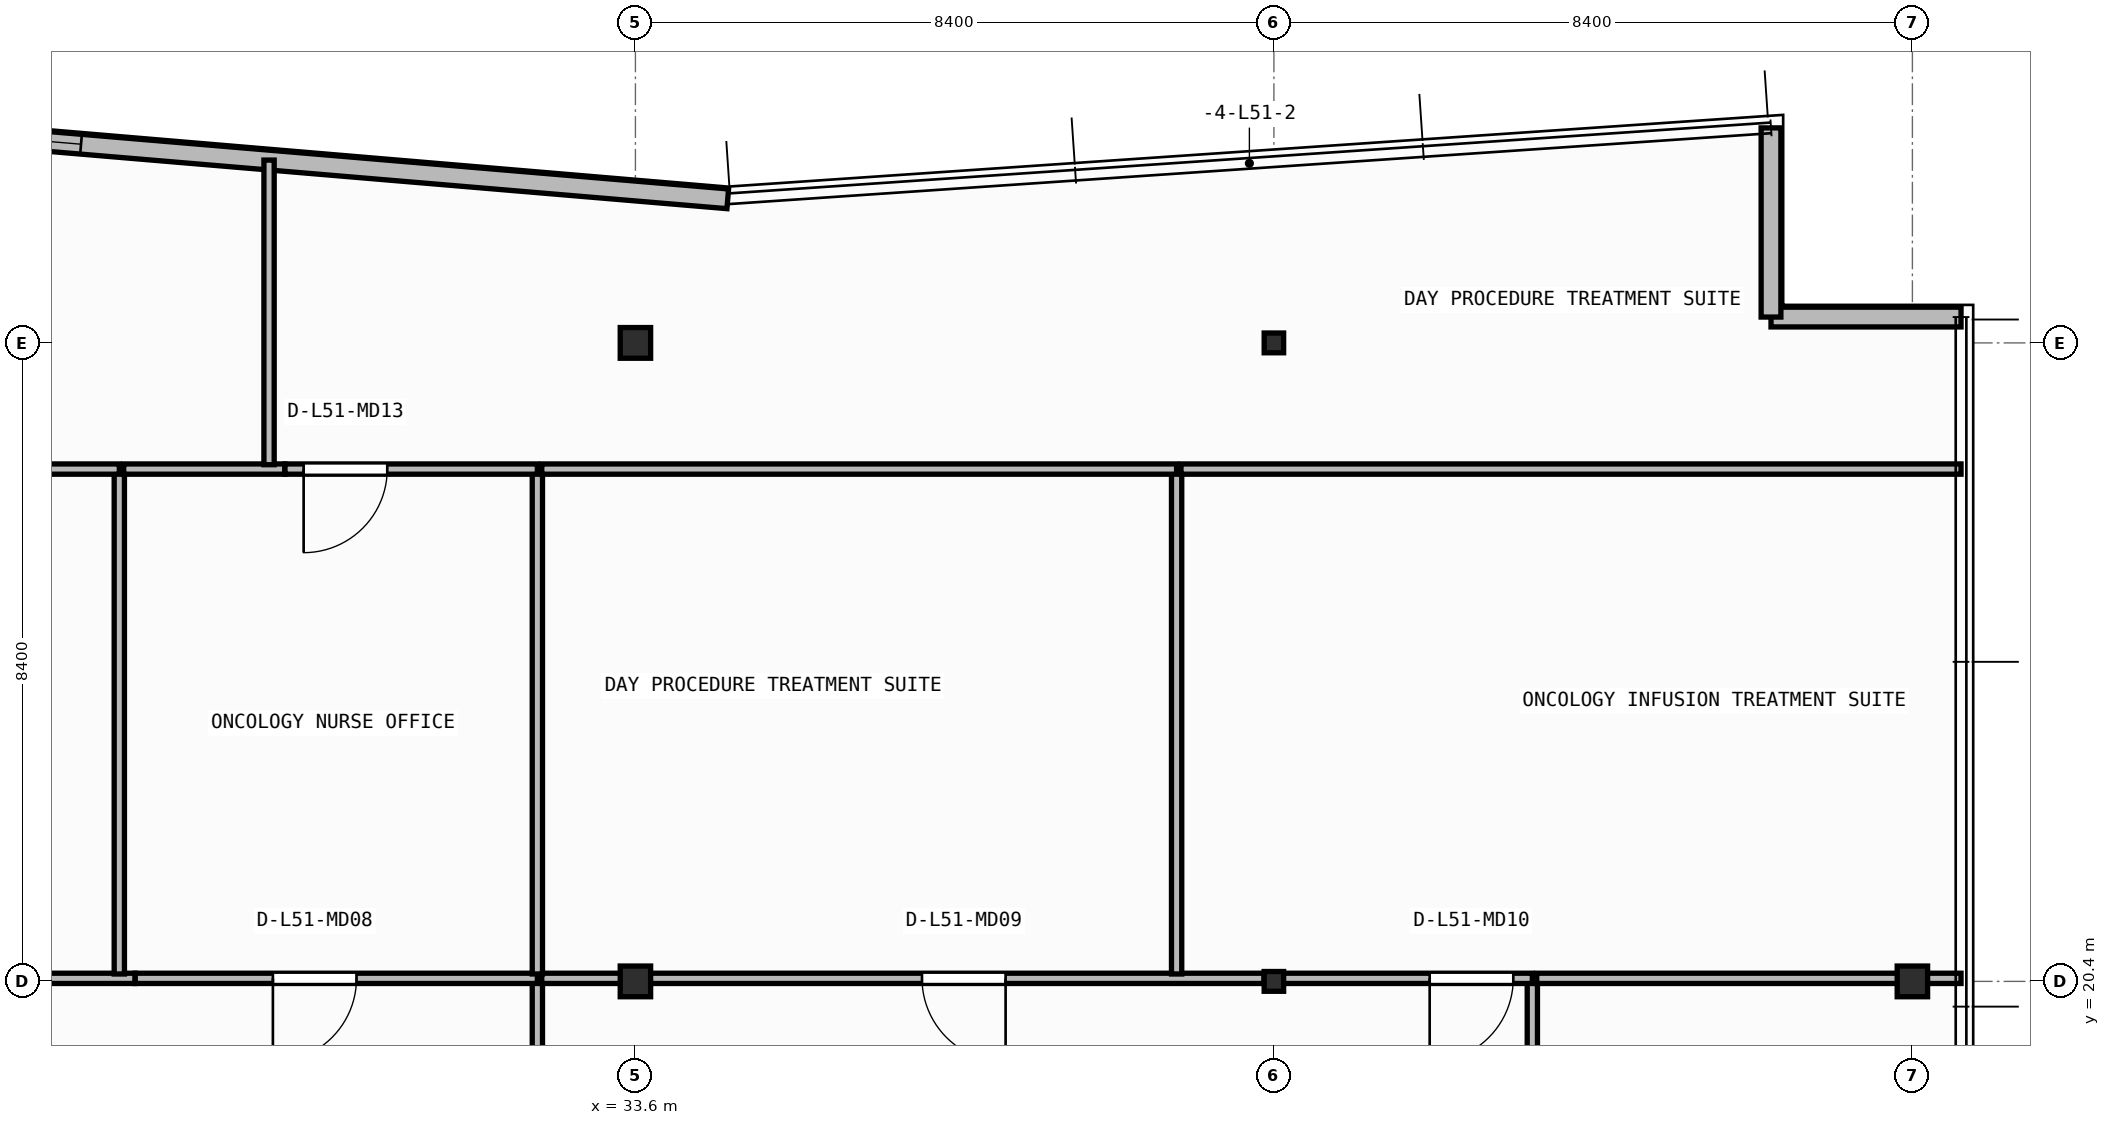
"""IFC4 building model, lengths in metres.
Left out: names, types, materials, properties, quantities, classifications, styles, units other than length and angle.
Written with IfcOpenShell. Run it as: python <this file> out.ifc"""

import sys

from ifc_helpers import new_model, si_unit, direction, frame, frame_2d, origin, origin_2d, place, context, subcontext, project, spatial, rectangle, i_section, extrude, element, fill, save


model = new_model("IFC4")
c1 = context("Model", 3, precision=1e-05, world=origin(), true_north=direction((0.0, 1.0)))
c2 = subcontext(c1, "Body", "Model", "MODEL_VIEW")
j1 = project(units=[si_unit("LENGTHUNIT", "METRE"), si_unit("PLANEANGLEUNIT", "RADIAN")], contexts=[c1])
p1 = place(None, origin())
s1 = spatial("IfcSite", under=j1, at=p1, CompositionType="ELEMENT")
p2 = place(p1, origin())
s2 = spatial("IfcBuilding", under=s1, at=p2, CompositionType="ELEMENT")
p3 = place(p2, frame((0.0, 0.0, 207.9)))
s3 = spatial("IfcBuildingStorey", under=s2, at=p3, CompositionType="ELEMENT", Elevation=207.9)
p4 = place(p3, frame((33.6, 20.4, 0.0), z_axis=(0.0, 0.0, 1.0), x_axis=(1.0, 0.0, 0.0)))
e1 = element("IfcColumn", 1, at=p4, inside=s3, PredefinedType="COLUMN", context=c2, shape_type="SweptSolid", body=[
    extrude(i_section(OverallWidth=0.4, OverallDepth=0.404, WebThickness=0.02, FlangeThickness=0.032, at=origin_2d()), origin(), (0.0, 0.0, 1.0), 3.95),
])
p5 = place(p3, frame((42.0, 20.4, 0.0), z_axis=(0.0, 0.0, 1.0), x_axis=(1.0, 0.0, 0.0)))
e2 = element("IfcColumn", 2, at=p5, inside=s3, PredefinedType="COLUMN", context=c2, shape_type="SweptSolid", body=[
    extrude(i_section(OverallWidth=0.256, OverallDepth=0.26, WebThickness=0.01, FlangeThickness=0.017, FilletRadius=0.013, at=origin_2d()), origin(), (0.0, 0.0, 1.0), 3.95),
])
for number, where, z_axis, x_axis in (
    (3, (50.4, 20.4, 0.0), (0.0, 0.0, 1.0), (1.0, 0.0, 0.0)),
    (4, (33.6, 28.8, 0.0), (0.0, 0.0, 1.0), (1.0, 0.0, 0.0)),
):
    element("IfcColumn", number, at=place(p3, frame(where, z_axis=z_axis, x_axis=x_axis)), inside=s3, PredefinedType="COLUMN", context=c2, shape_type="SweptSolid", body=[
        extrude(i_section(OverallWidth=0.4, OverallDepth=0.404, WebThickness=0.02, FlangeThickness=0.032, at=origin_2d()), origin(), (0.0, 0.0, 1.0), 3.95),
    ])
p6 = place(p3, frame((42.0, 28.8, 0.0), z_axis=(0.0, 0.0, 1.0), x_axis=(1.0, 0.0, 0.0)))
e5 = element("IfcColumn", 5, at=p6, inside=s3, PredefinedType="COLUMN", context=c2, shape_type="SweptSolid", body=[
    extrude(i_section(OverallWidth=0.256, OverallDepth=0.26, WebThickness=0.01, FlangeThickness=0.017, FilletRadius=0.013, at=origin_2d()), origin(), (0.0, 0.0, 1.0), 3.95),
])
p7 = place(p3, frame((51.04, 29.14, 0.0), z_axis=(0.0, 0.0, 1.0), x_axis=(-1.0, 0.0, 0.0)))
e6 = element("IfcWall", 6, at=p7, inside=s3, PredefinedType="STANDARD", context=c2, shape_type="SweptSolid", body=[
    extrude(rectangle(XDim=2.5, YDim=0.26, at=frame_2d((1.25, 0.0))), origin(), (0.0, 0.0, 1.0), 3.71),
])
p8 = place(p3, frame((48.54, 29.14, 0.0), z_axis=(0.0, 0.0, 1.0), x_axis=(0.0, 1.0, 0.0)))
e7 = element("IfcWall", 7, at=p8, inside=s3, PredefinedType="STANDARD", context=c2, shape_type="SweptSolid", body=[
    extrude(rectangle(XDim=2.489, YDim=0.26, at=frame_2d((1.245, 0.0))), origin(), (0.0, 0.0, 1.0), 3.71),
])
p9 = place(p3, frame((34.815, 30.696, 0.0), z_axis=(0.0, 0.0, 1.0), x_axis=(-0.996454704935, 0.084130975344, 0.0)))
e8 = element("IfcWall", 8, at=p9, inside=s3, PredefinedType="STANDARD", context=c2, shape_type="SweptSolid", body=[
    extrude(rectangle(XDim=13.401, YDim=0.26, at=frame_2d((6.701, 0.0))), origin(), (0.0, 0.0, 1.0), 3.71),
])
p10 = place(p9, frame((8.539, 0.0, 0.9)))
e9 = element("IfcOpeningElement", 9, at=p10, cuts=e8, PredefinedType="OPENING", context=c2, shape_type="SweptSolid", body=[
    extrude(rectangle(XDim=2.4, YDim=1.65, at=frame_2d((1.2, 0.825))), frame((0.0, 0.14, 0.0), z_axis=(0.0, -1.0, 0.0), x_axis=(1.0, 0.0, 0.0)), (0.0, 0.0, 1.0), 0.28),
])
p11 = place(p3, frame((32.31, 14.76, 0.0), z_axis=(0.0, 0.0, 1.0), x_axis=(0.0, 1.0, 0.0)))
e10 = element("IfcWall", 10, at=p11, inside=s3, PredefinedType="PARTITIONING", context=c2, shape_type="SweptSolid", body=[
    extrude(rectangle(XDim=5.68, YDim=0.135, at=frame_2d((2.84, 0.0))), origin(), (0.0, 0.0, 1.0), 3.71),
])
p12 = place(p3, frame((27.018, 20.44, 0.0), z_axis=(0.0, 0.0, 1.0), x_axis=(-1.0, 0.0, 0.0)))
e11 = element("IfcWall", 11, at=p12, inside=s3, PredefinedType="PARTITIONING", context=c2, shape_type="SweptSolid", body=[
    extrude(rectangle(XDim=4.83, YDim=0.135, at=frame_2d((2.415, 0.0))), origin(), (0.0, 0.0, 1.0), 3.152),
])
p13 = place(p3, frame((32.31, 20.44, 0.0), z_axis=(0.0, 0.0, 1.0), x_axis=(-1.0, 0.0, 0.0)))
e12 = element("IfcWall", 12, at=p13, inside=s3, PredefinedType="PARTITIONING", context=c2, shape_type="SweptSolid", body=[
    extrude(rectangle(XDim=5.291, YDim=0.135, at=frame_2d((2.645, 0.0))), origin(), (0.0, 0.0, 1.0), 3.152),
])
p14 = place(p13, frame((2.379, 0.0, 0.0)))
e13 = element("IfcOpeningElement", 13, at=p14, cuts=e12, PredefinedType="OPENING", context=c2, shape_type="SweptSolid", body=[
    extrude(rectangle(XDim=1.1, YDim=2.1, at=frame_2d((0.55, 1.05))), frame((0.0, 0.077, 0.0), z_axis=(0.0, -1.0, 0.0), x_axis=(1.0, 0.0, 0.0)), (0.0, 0.0, 1.0), 0.155),
])
p15 = place(p3, frame((45.4, 14.76, 0.0), z_axis=(0.0, 0.0, 1.0), x_axis=(0.0, 1.0, 0.0)))
e14 = element("IfcWall", 14, at=p15, inside=s3, PredefinedType="PARTITIONING", context=c2, shape_type="SweptSolid", body=[
    extrude(rectangle(XDim=5.68, YDim=0.135, at=frame_2d((2.84, 0.0))), origin(), (0.0, 0.0, 1.0), 3.71),
])
p16 = place(p3, frame((41.872, 20.44, 0.0), z_axis=(0.0, 0.0, 1.0), x_axis=(-1.0, 0.0, 0.0)))
e15 = element("IfcWall", 15, at=p16, inside=s3, PredefinedType="PARTITIONING", context=c2, shape_type="SweptSolid", body=[
    extrude(rectangle(XDim=9.505, YDim=0.135, at=frame_2d((4.752, 0.0))), origin(), (0.0, 0.0, 1.0), 3.152),
])
p17 = place(p16, frame((3.402, 0.0, 0.0)))
e16 = element("IfcOpeningElement", 16, at=p17, cuts=e15, PredefinedType="OPENING", context=c2, shape_type="SweptSolid", body=[
    extrude(rectangle(XDim=1.1, YDim=2.1, at=frame_2d((0.55, 1.05))), frame((0.0, 0.077, 0.0), z_axis=(0.0, -1.0, 0.0), x_axis=(1.0, 0.0, 0.0)), (0.0, 0.0, 1.0), 0.155),
])
p18 = place(p3, frame((45.4, 20.44, 0.0), z_axis=(0.0, 0.0, 1.0), x_axis=(-1.0, 0.0, 0.0)))
e17 = element("IfcWall", 17, at=p18, inside=s3, PredefinedType="PARTITIONING", context=c2, shape_type="SweptSolid", body=[
    extrude(rectangle(XDim=3.526, YDim=0.135, at=frame_2d((1.763, 0.0))), origin(), (0.0, 0.0, 1.0), 3.152),
])
p19 = place(p18, frame((0.25, 0.0, 0.0)))
e18 = element("IfcOpeningElement", 18, at=p19, cuts=e17, PredefinedType="OPENING", context=c2, shape_type="SweptSolid", body=[
    extrude(rectangle(XDim=1.1, YDim=2.1, at=frame_2d((0.55, 1.05))), frame((0.0, 0.077, 0.0), z_axis=(0.0, -1.0, 0.0), x_axis=(1.0, 0.0, 0.0)), (0.0, 0.0, 1.0), 0.155),
])
p20 = place(p3, frame((51.04, 20.44, 0.0), z_axis=(0.0, 0.0, 1.0), x_axis=(-1.0, 0.0, 0.0)))
e19 = element("IfcWall", 19, at=p20, inside=s3, PredefinedType="PARTITIONING", context=c2, shape_type="SweptSolid", body=[
    extrude(rectangle(XDim=5.583, YDim=0.135, at=frame_2d((2.791, 0.0))), origin(), (0.0, 0.0, 1.0), 3.152),
])
p21 = place(p3, frame((26.81, 20.498, 0.0), z_axis=(0.0, 0.0, 1.0), x_axis=(0.0, 1.0, 0.0)))
e20 = element("IfcWall", 20, at=p21, inside=s3, PredefinedType="PARTITIONING", context=c2, shape_type="SweptSolid", body=[
    extrude(rectangle(XDim=6.642, YDim=0.135, at=frame_2d((3.321, 0.0))), origin(), (0.0, 0.0, 1.0), 3.71),
])
p22 = place(p3, frame((26.81, 27.14, 0.0), z_axis=(0.0, 0.0, 1.0), x_axis=(-1.0, 0.0, 0.0)))
e21 = element("IfcWall", 21, at=p22, inside=s3, PredefinedType="PARTITIONING", context=c2, shape_type="SweptSolid", body=[
    extrude(rectangle(XDim=13.03, YDim=0.135, at=frame_2d((6.515, 0.0))), origin(), (0.0, 0.0, 1.0), 3.71),
])
p23 = place(p22, frame((5.1, 0.0, 0.0)))
e22 = element("IfcOpeningElement", 22, at=p23, cuts=e21, PredefinedType="OPENING", context=c2, shape_type="SweptSolid", body=[
    extrude(rectangle(XDim=1.1, YDim=2.1, at=frame_2d((0.55, 1.05))), frame((0.0, 0.077, 0.0), z_axis=(0.0, -1.0, 0.0), x_axis=(1.0, 0.0, 0.0)), (0.0, 0.0, 1.0), 0.155),
])
p24 = place(p3, frame((32.31, 20.498, 0.0), z_axis=(0.0, 0.0, 1.0), x_axis=(0.0, 1.0, 0.0)))
e23 = element("IfcWall", 23, at=p24, inside=s3, PredefinedType="PARTITIONING", context=c2, shape_type="SweptSolid", body=[
    extrude(rectangle(XDim=6.642, YDim=0.135, at=frame_2d((3.321, 0.0))), origin(), (0.0, 0.0, 1.0), 3.71),
])
p25 = place(p3, frame((28.988, 27.14, 0.0), z_axis=(0.0, 0.0, 1.0), x_axis=(-1.0, 0.0, 0.0)))
e24 = element("IfcWall", 24, at=p25, inside=s3, PredefinedType="PARTITIONING", context=c2, shape_type="SweptSolid", body=[
    extrude(rectangle(XDim=2.12, YDim=0.135, at=frame_2d((1.06, 0.0))), origin(), (0.0, 0.0, 1.0), 3.71),
])
p26 = place(p3, frame((32.31, 27.14, 0.0), z_axis=(0.0, 0.0, 1.0), x_axis=(-1.0, 0.0, 0.0)))
e25 = element("IfcWall", 25, at=p26, inside=s3, PredefinedType="PARTITIONING", context=c2, shape_type="SweptSolid", body=[
    extrude(rectangle(XDim=3.321, YDim=0.135, at=frame_2d((1.66, 0.0))), origin(), (0.0, 0.0, 1.0), 3.71),
])
p27 = place(p26, frame((1.975, 0.0, 0.0)))
e26 = element("IfcOpeningElement", 26, at=p27, cuts=e25, PredefinedType="OPENING", context=c2, shape_type="SweptSolid", body=[
    extrude(rectangle(XDim=1.1, YDim=2.1, at=frame_2d((0.55, 1.05))), frame((0.0, 0.077, 0.0), z_axis=(0.0, -1.0, 0.0), x_axis=(1.0, 0.0, 0.0)), (0.0, 0.0, 1.0), 0.155),
])
p28 = place(p3, frame((40.72, 20.498, 0.0), z_axis=(0.0, 0.0, 1.0), x_axis=(0.0, 1.0, 0.0)))
e27 = element("IfcWall", 27, at=p28, inside=s3, PredefinedType="PARTITIONING", context=c2, shape_type="SweptSolid", body=[
    extrude(rectangle(XDim=6.642, YDim=0.135, at=frame_2d((3.321, 0.0))), origin(), (0.0, 0.0, 1.0), 3.71),
])
p29 = place(p3, frame((40.72, 27.14, 0.0), z_axis=(0.0, 0.0, 1.0), x_axis=(-1.0, 0.0, 0.0)))
e28 = element("IfcWall", 28, at=p29, inside=s3, PredefinedType="PARTITIONING", context=c2, shape_type="SweptSolid", body=[
    extrude(rectangle(XDim=8.353, YDim=0.135, at=frame_2d((4.176, 0.0))), origin(), (0.0, 0.0, 1.0), 3.71),
])
p30 = place(p3, frame((51.04, 27.14, 0.0), z_axis=(0.0, 0.0, 1.0), x_axis=(-1.0, 0.0, 0.0)))
e29 = element("IfcWall", 29, at=p30, inside=s3, PredefinedType="PARTITIONING", context=c2, shape_type="SweptSolid", body=[
    extrude(rectangle(XDim=10.262, YDim=0.135, at=frame_2d((5.131, 0.0))), origin(), (0.0, 0.0, 1.0), 3.71),
])
p31 = place(p3, frame((28.78, 27.198, 0.0), z_axis=(0.0, 0.0, 1.0), x_axis=(0.0, 1.0, 0.0)))
e30 = element("IfcWall", 30, at=p31, inside=s3, PredefinedType="PARTITIONING", context=c2, shape_type="SweptSolid", body=[
    extrude(rectangle(XDim=4.008, YDim=0.135, at=frame_2d((2.004, 0.0))), origin(), (0.0, 0.0, 1.0), 3.71),
])
p32 = place(p10, origin())
e31 = element("IfcWindow", 31, at=p32, inside=s3, PartitioningType="SINGLE_PANEL", PredefinedType="WINDOW", context=c2, shape_type="SweptSolid", body=[
    extrude(rectangle(XDim=2.4, YDim=1.65, at=frame_2d((1.2, 0.825))), frame((0.0, 0.03, 0.0), z_axis=(0.0, -1.0, 0.0), x_axis=(1.0, 0.0, 0.0)), (0.0, 0.0, 1.0), 0.06),
])
fill(e9, e31)
p33 = place(p14, origin())
e32 = element("IfcDoor", 32, at=p33, inside=s3, OperationType="SINGLE_SWING_RIGHT", PredefinedType="DOOR", context=c2, shape_type="SweptSolid", body=[
    extrude(rectangle(XDim=1.1, YDim=2.1, at=frame_2d((0.55, 1.05))), frame((0.0, 0.025, 0.0), z_axis=(0.0, -1.0, 0.0), x_axis=(1.0, 0.0, 0.0)), (0.0, 0.0, 1.0), 0.05),
])
fill(e13, e32)
p34 = place(p17, origin())
e33 = element("IfcDoor", 33, at=p34, inside=s3, OperationType="SINGLE_SWING_LEFT", PredefinedType="DOOR", context=c2, shape_type="SweptSolid", body=[
    extrude(rectangle(XDim=1.1, YDim=2.1, at=frame_2d((0.55, 1.05))), frame((0.0, 0.025, 0.0), z_axis=(0.0, -1.0, 0.0), x_axis=(1.0, 0.0, 0.0)), (0.0, 0.0, 1.0), 0.05),
])
fill(e16, e33)
p35 = place(p19, origin())
e34 = element("IfcDoor", 34, at=p35, inside=s3, OperationType="SINGLE_SWING_RIGHT", PredefinedType="DOOR", context=c2, shape_type="SweptSolid", body=[
    extrude(rectangle(XDim=1.1, YDim=2.1, at=frame_2d((0.55, 1.05))), frame((0.0, 0.025, 0.0), z_axis=(0.0, -1.0, 0.0), x_axis=(1.0, 0.0, 0.0)), (0.0, 0.0, 1.0), 0.05),
])
fill(e18, e34)
p36 = place(p27, origin())
e35 = element("IfcDoor", 35, at=p36, inside=s3, OperationType="SINGLE_SWING_RIGHT", PredefinedType="DOOR", context=c2, shape_type="SweptSolid", body=[
    extrude(rectangle(XDim=1.1, YDim=2.1, at=frame_2d((0.55, 1.05))), frame((0.0, 0.025, 0.0), z_axis=(0.0, -1.0, 0.0), x_axis=(1.0, 0.0, 0.0)), (0.0, 0.0, 1.0), 0.05),
])
fill(e26, e35)
save(model, sys.argv[1])
